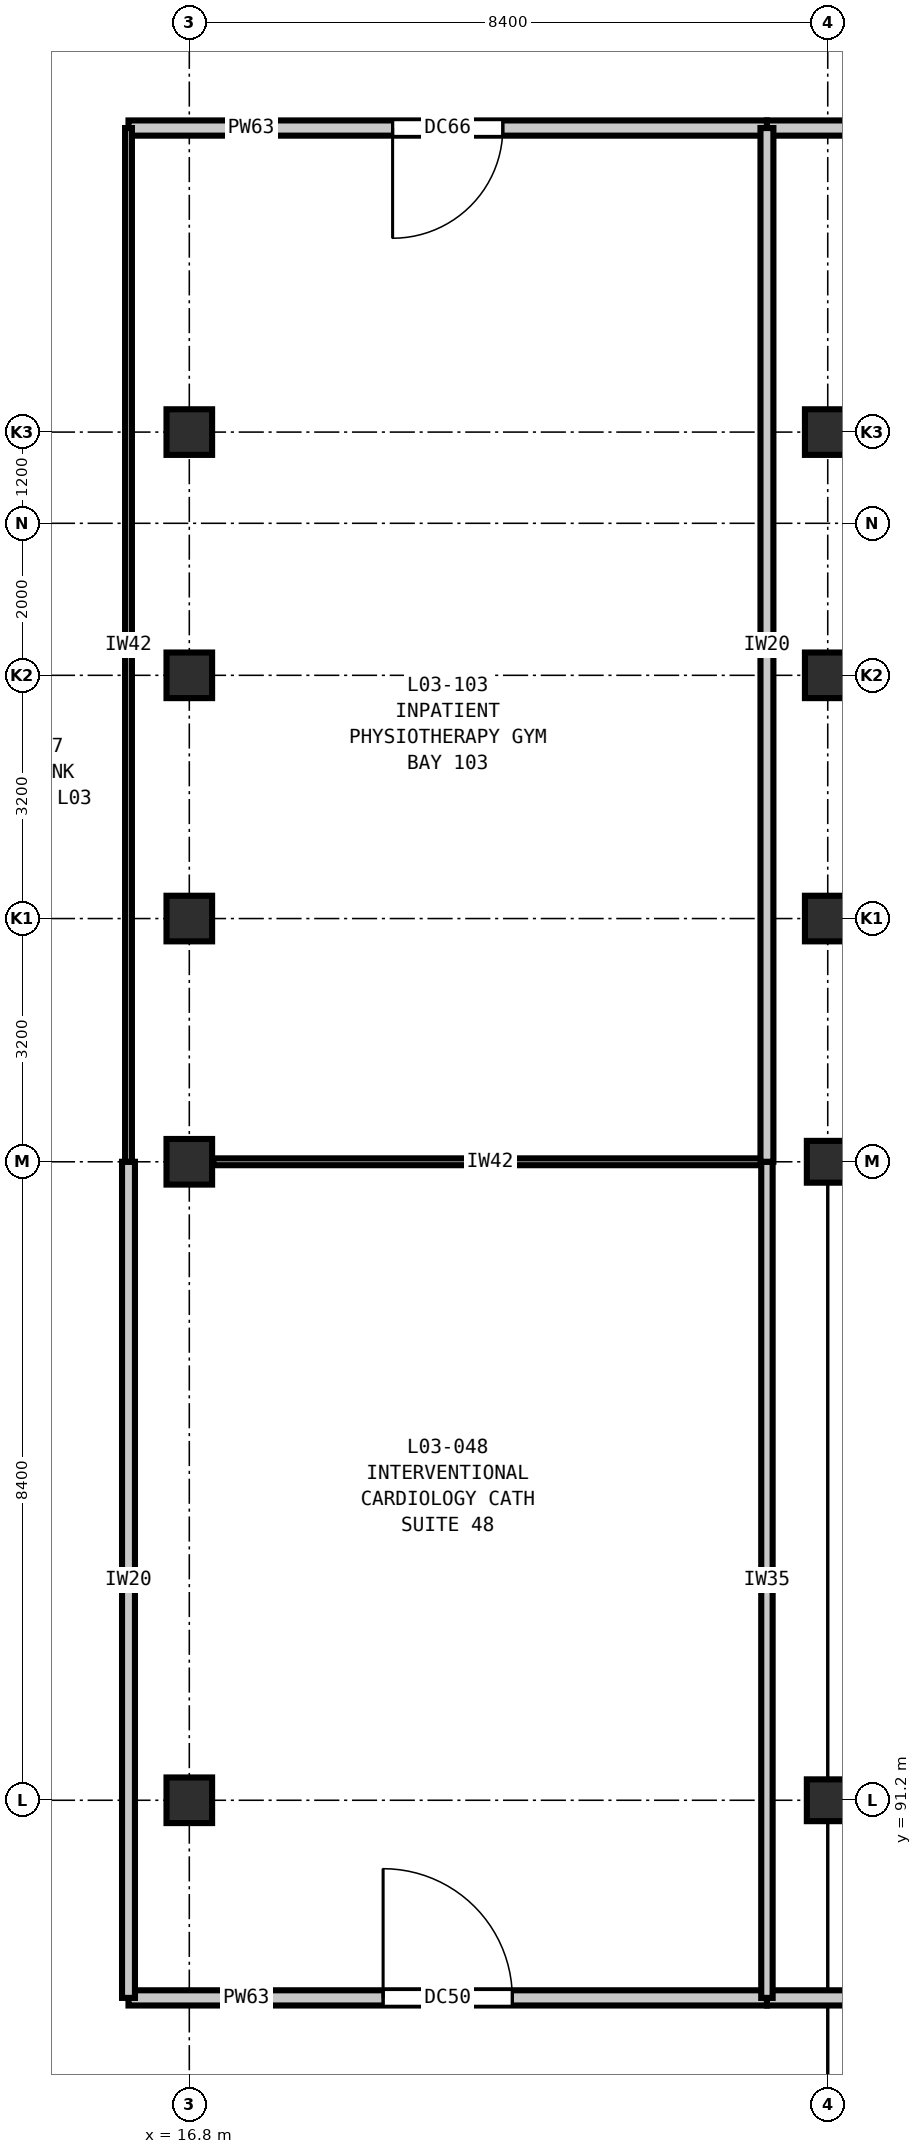
"""IFC4 building model, lengths in metres.
Left out: names, types, materials, properties, quantities, classifications, styles, units other than length and angle.
Written with IfcOpenShell. Run it as: python <this file> out.ifc"""

import sys

from ifc_helpers import new_model, si_unit, direction, frame, frame_2d, origin, origin_2d, place, context, subcontext, project, spatial, rectangle, extrude, element, fill, save


model = new_model("IFC4")
c1 = context("Model", 3, precision=1e-05, world=origin(), true_north=direction((0.0, 1.0)))
c2 = subcontext(c1, "Body", "Model", "MODEL_VIEW")
j1 = project(units=[si_unit("LENGTHUNIT", "METRE"), si_unit("PLANEANGLEUNIT", "RADIAN")], contexts=[c1])
p1 = place(None, origin())
s1 = spatial("IfcSite", under=j1, at=p1, CompositionType="ELEMENT")
p2 = place(p1, origin())
s2 = spatial("IfcBuilding", under=s1, at=p2, CompositionType="ELEMENT")
p3 = place(p2, frame((0.0, 0.0, 16.2)))
s3 = spatial("IfcBuildingStorey", under=s2, at=p3, CompositionType="ELEMENT", Elevation=16.2)
for number, where, z_axis, x_axis in (
    (1, (16.8, 91.2, 0.0), (0.0, 0.0, 1.0), (1.0, 0.0, 0.0)),
    (2, (16.8, 99.6, 0.0), (0.0, 0.0, 1.0), (1.0, 0.0, 0.0)),
    (3, (16.8, 102.8, 0.0), (0.0, 0.0, 1.0), (1.0, 0.0, 0.0)),
    (4, (16.8, 106.0, 0.0), (0.0, 0.0, 1.0), (1.0, 0.0, 0.0)),
    (5, (16.8, 109.2, 0.0), (0.0, 0.0, 1.0), (1.0, 0.0, 0.0)),
):
    element("IfcColumn", number, at=place(p3, frame(where, z_axis=z_axis, x_axis=x_axis)), inside=s3, PredefinedType="COLUMN", context=c2, shape_type="SweptSolid", body=[
        extrude(rectangle(XDim=0.6, YDim=0.6, at=origin_2d()), origin(), (0.0, 0.0, 1.0), 4.2),
    ])
for number, where, z_axis, x_axis in (
    (6, (25.2, 91.2, 0.0), (0.0, 0.0, 1.0), (1.0, 0.0, 0.0)),
    (7, (25.2, 99.6, 0.0), (0.0, 0.0, 1.0), (1.0, 0.0, 0.0)),
):
    element("IfcColumn", number, at=place(p3, frame(where, z_axis=z_axis, x_axis=x_axis)), inside=s3, PredefinedType="COLUMN", context=c2, shape_type="SweptSolid", body=[
        extrude(rectangle(XDim=0.55, YDim=0.55, at=origin_2d()), origin(), (0.0, 0.0, 1.0), 4.2),
    ])
for number, where, z_axis, x_axis in (
    (8, (25.2, 102.8, 0.0), (0.0, 0.0, 1.0), (1.0, 0.0, 0.0)),
    (9, (25.2, 106.0, 0.0), (0.0, 0.0, 1.0), (1.0, 0.0, 0.0)),
    (10, (25.2, 109.2, 0.0), (0.0, 0.0, 1.0), (1.0, 0.0, 0.0)),
):
    element("IfcColumn", number, at=place(p3, frame(where, z_axis=z_axis, x_axis=x_axis)), inside=s3, PredefinedType="COLUMN", context=c2, shape_type="SweptSolid", body=[
        extrude(rectangle(XDim=0.6, YDim=0.6, at=origin_2d()), origin(), (0.0, 0.0, 1.0), 4.2),
    ])
p4 = place(p3, frame((16.0, 88.6, 0.0), z_axis=(0.0, 0.0, 1.0), x_axis=(1.0, 0.0, 0.0)))
e11 = element("IfcWall", 11, at=p4, inside=s3, PredefinedType="PARTITIONING", context=c2, shape_type="SweptSolid", body=[
    extrude(rectangle(XDim=8.4, YDim=0.2, at=frame_2d((4.2, 0.0))), origin(), (0.0, 0.0, 1.0), 3.89),
])
p5 = place(p4, frame((3.35, 0.0, 0.0)))
e12 = element("IfcOpeningElement", 12, at=p5, cuts=e11, PredefinedType="OPENING", context=c2, shape_type="SweptSolid", body=[
    extrude(rectangle(XDim=1.7, YDim=2.3, at=frame_2d((0.85, 1.15))), frame((0.0, 0.11, 0.0), z_axis=(0.0, -1.0, 0.0), x_axis=(1.0, 0.0, 0.0)), (0.0, 0.0, 1.0), 0.22),
])
p6 = place(p3, frame((24.4, 88.6, 0.0), z_axis=(0.0, 0.0, 1.0), x_axis=(1.0, 0.0, 0.0)))
e13 = element("IfcWall", 13, at=p6, inside=s3, PredefinedType="PARTITIONING", context=c2, shape_type="SweptSolid", body=[
    extrude(rectangle(XDim=4.2, YDim=0.2, at=frame_2d((2.1, 0.0))), origin(), (0.0, 0.0, 1.0), 3.89),
])
p7 = place(p6, frame((1.175, 0.0, 0.0)))
e14 = element("IfcOpeningElement", 14, at=p7, cuts=e13, PredefinedType="OPENING", context=c2, shape_type="SweptSolid", body=[
    extrude(rectangle(XDim=1.85, YDim=2.3, at=frame_2d((0.925, 1.15))), frame((0.0, 0.11, 0.0), z_axis=(0.0, -1.0, 0.0), x_axis=(1.0, 0.0, 0.0)), (0.0, 0.0, 1.0), 0.22),
])
p8 = place(p3, frame((17.115, 99.6, 0.0), z_axis=(0.0, 0.0, 1.0), x_axis=(1.0, 0.0, 0.0)))
e15 = element("IfcWall", 15, at=p8, inside=s3, PredefinedType="PARTITIONING", context=c2, shape_type="SweptSolid", body=[
    extrude(rectangle(XDim=7.285, YDim=0.09, at=frame_2d((3.643, 0.0))), origin(), (0.0, 0.0, 1.0), 3.535),
])
p9 = place(p3, frame((16.0, 113.2, 0.0), z_axis=(0.0, 0.0, 1.0), x_axis=(1.0, 0.0, 0.0)))
e16 = element("IfcWall", 16, at=p9, inside=s3, PredefinedType="PARTITIONING", context=c2, shape_type="SweptSolid", body=[
    extrude(rectangle(XDim=8.4, YDim=0.2, at=frame_2d((4.2, 0.0))), origin(), (0.0, 0.0, 1.0), 3.89),
])
p10 = place(p9, frame((3.475, 0.0, 0.0)))
e17 = element("IfcOpeningElement", 17, at=p10, cuts=e16, PredefinedType="OPENING", context=c2, shape_type="SweptSolid", body=[
    extrude(rectangle(XDim=1.45, YDim=2.25, at=frame_2d((0.725, 1.125))), frame((0.0, 0.11, 0.0), z_axis=(0.0, -1.0, 0.0), x_axis=(1.0, 0.0, 0.0)), (0.0, 0.0, 1.0), 0.22),
])
p11 = place(p3, frame((24.4, 113.2, 0.0), z_axis=(0.0, 0.0, 1.0), x_axis=(1.0, 0.0, 0.0)))
e18 = element("IfcWall", 18, at=p11, inside=s3, PredefinedType="PARTITIONING", context=c2, shape_type="SweptSolid", body=[
    extrude(rectangle(XDim=5.4, YDim=0.2, at=frame_2d((2.7, 0.0))), origin(), (0.0, 0.0, 1.0), 3.89),
])
p12 = place(p11, frame((1.925, 0.0, 0.0)))
e19 = element("IfcOpeningElement", 19, at=p12, cuts=e18, PredefinedType="OPENING", context=c2, shape_type="SweptSolid", body=[
    extrude(rectangle(XDim=1.55, YDim=2.25, at=frame_2d((0.775, 1.125))), frame((0.0, 0.11, 0.0), z_axis=(0.0, -1.0, 0.0), x_axis=(1.0, 0.0, 0.0)), (0.0, 0.0, 1.0), 0.22),
])
p13 = place(p3, frame((16.0, 88.6, 0.0), z_axis=(0.0, 0.0, 1.0), x_axis=(0.0, 1.0, 0.0)))
e20 = element("IfcWall", 20, at=p13, inside=s3, PredefinedType="PARTITIONING", context=c2, shape_type="SweptSolid", body=[
    extrude(rectangle(XDim=11.0, YDim=0.17, at=frame_2d((5.5, 0.0))), origin(), (0.0, 0.0, 1.0), 3.89),
])
p14 = place(p3, frame((16.0, 99.6, 0.0), z_axis=(0.0, 0.0, 1.0), x_axis=(0.0, 1.0, 0.0)))
e21 = element("IfcWall", 21, at=p14, inside=s3, PredefinedType="PARTITIONING", context=c2, shape_type="SweptSolid", body=[
    extrude(rectangle(XDim=13.6, YDim=0.09, at=frame_2d((6.8, 0.0))), origin(), (0.0, 0.0, 1.0), 3.89),
])
p15 = place(p3, frame((24.4, 88.6, 0.0), z_axis=(0.0, 0.0, 1.0), x_axis=(0.0, 1.0, 0.0)))
e22 = element("IfcWall", 22, at=p15, inside=s3, PredefinedType="PARTITIONING", context=c2, shape_type="SweptSolid", body=[
    extrude(rectangle(XDim=11.0, YDim=0.15, at=frame_2d((5.5, 0.0))), origin(), (0.0, 0.0, 1.0), 3.89),
])
p16 = place(p3, frame((24.4, 99.6, 0.0), z_axis=(0.0, 0.0, 1.0), x_axis=(0.0, 1.0, 0.0)))
e23 = element("IfcWall", 23, at=p16, inside=s3, PredefinedType="PARTITIONING", context=c2, shape_type="SweptSolid", body=[
    extrude(rectangle(XDim=13.6, YDim=0.17, at=frame_2d((6.8, 0.0))), origin(), (0.0, 0.0, 1.0), 3.89),
])
p17 = place(p5, origin())
e24 = element("IfcDoor", 24, at=p17, inside=s3, OperationType="SINGLE_SWING_LEFT", PredefinedType="DOOR", context=c2, shape_type="SweptSolid", body=[
    extrude(rectangle(XDim=1.7, YDim=2.3, at=frame_2d((0.85, 1.15))), frame((0.0, 0.025, 0.0), z_axis=(0.0, -1.0, 0.0), x_axis=(1.0, 0.0, 0.0)), (0.0, 0.0, 1.0), 0.05),
])
fill(e12, e24)
p18 = place(p10, frame((1.45, 0.0, 0.0), z_axis=(0.0, 0.0, 1.0), x_axis=(-1.0, 0.0, 0.0)))
e25 = element("IfcDoor", 25, at=p18, inside=s3, OperationType="SINGLE_SWING_RIGHT", PredefinedType="DOOR", context=c2, shape_type="SweptSolid", body=[
    extrude(rectangle(XDim=1.45, YDim=2.25, at=frame_2d((0.725, 1.125))), frame((0.0, 0.025, 0.0), z_axis=(0.0, -1.0, 0.0), x_axis=(1.0, 0.0, 0.0)), (0.0, 0.0, 1.0), 0.05),
])
fill(e17, e25)
save(model, sys.argv[1])
